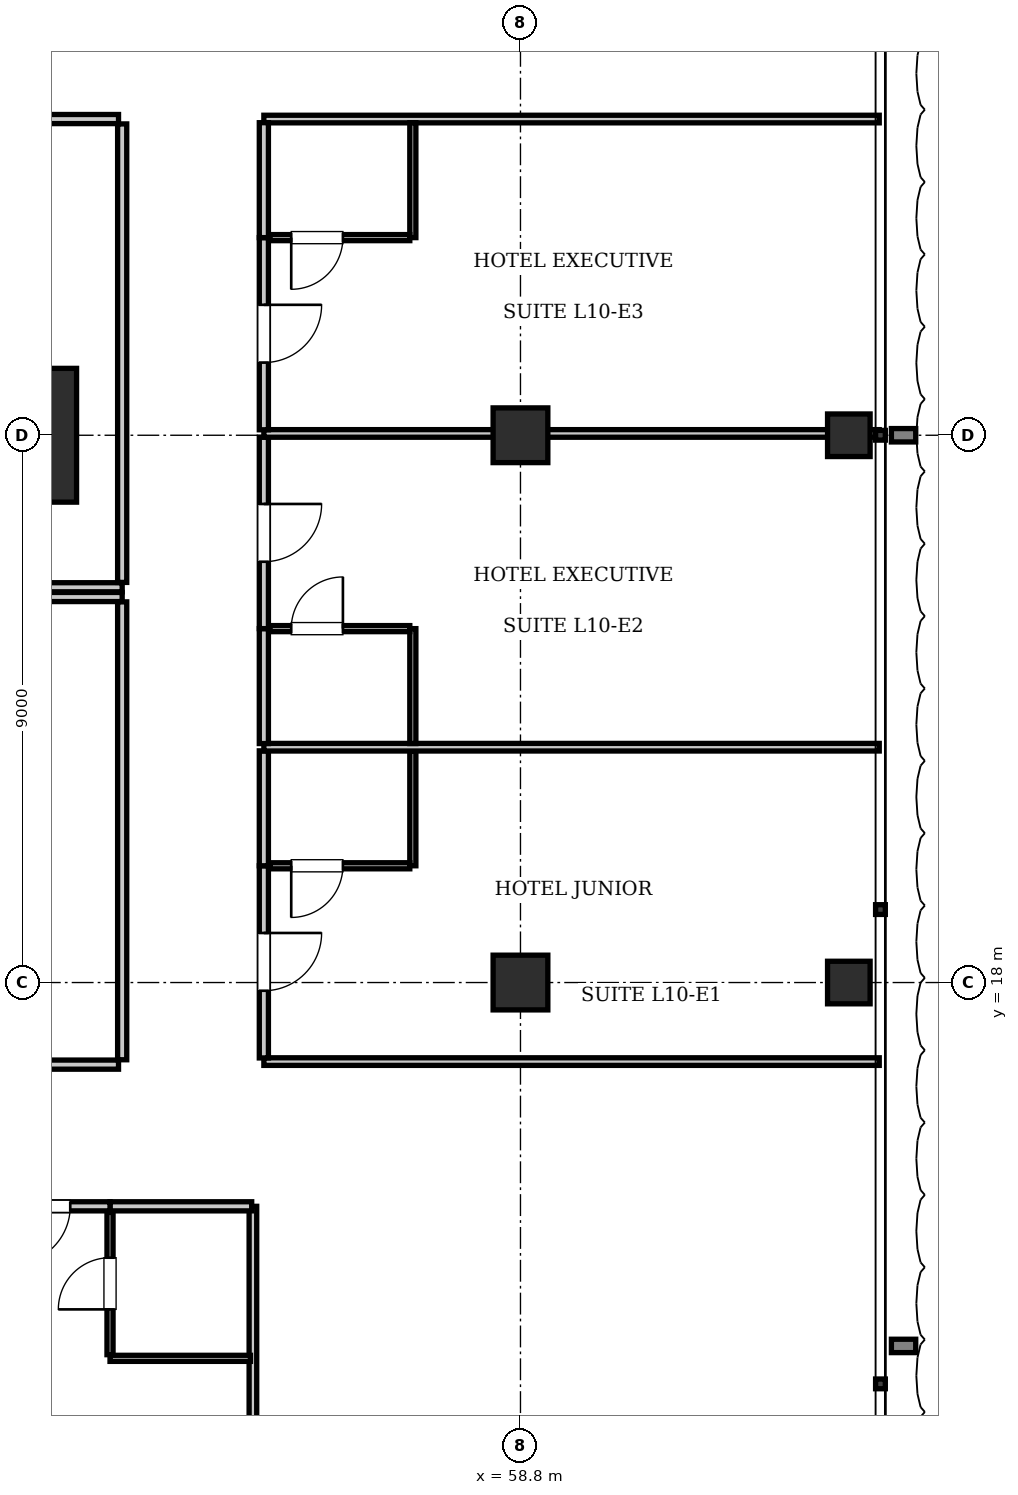
"""IFC4 building model, lengths in metres.
Left out: names, types, materials, properties, quantities, classifications, styles, units other than length and angle.
Written with IfcOpenShell. Run it as: python <this file> out.ifc"""

import sys

from ifc_helpers import new_model, si_unit, direction, frame, frame_2d, origin, origin_2d, place, context, subcontext, project, spatial, rectangle, i_section, extrude, element, fill, save


model = new_model("IFC4")
c1 = context("Model", 3, precision=1e-05, world=origin(), true_north=direction((0.0, 1.0)))
c2 = subcontext(c1, "Body", "Model", "MODEL_VIEW")
j1 = project(units=[si_unit("LENGTHUNIT", "METRE"), si_unit("PLANEANGLEUNIT", "RADIAN")], contexts=[c1])
p1 = place(None, origin())
s1 = spatial("IfcSite", under=j1, at=p1, CompositionType="ELEMENT")
p2 = place(p1, origin())
s2 = spatial("IfcBuilding", under=s1, at=p2, CompositionType="ELEMENT")
p3 = place(p2, frame((0.0, 0.0, 46.2)))
s3 = spatial("IfcBuildingStorey", under=s2, at=p3, CompositionType="ELEMENT", Elevation=46.2)
p4 = place(p3, frame((50.4, 27.0, 0.0), z_axis=(0.0, 0.0, 1.0), x_axis=(1.0, 0.0, 0.0)))
e1 = element("IfcColumn", 1, at=p4, inside=s3, PredefinedType="COLUMN", context=c2, shape_type="SweptSolid", body=[
    extrude(rectangle(XDim=2.2, YDim=2.2, at=origin_2d()), origin(), (0.0, 0.0, 1.0), 3.85),
])
for number, where, z_axis, x_axis in (
    (2, (58.8, 18.0, 0.0), (0.0, 0.0, 1.0), (1.0, 0.0, 0.0)),
    (3, (58.8, 27.0, 0.0), (0.0, 0.0, 1.0), (1.0, 0.0, 0.0)),
):
    element("IfcColumn", number, at=place(p3, frame(where, z_axis=z_axis, x_axis=x_axis)), inside=s3, PredefinedType="COLUMN", context=c2, shape_type="SweptSolid", body=[
        extrude(rectangle(XDim=0.9, YDim=0.9, at=origin_2d()), origin(), (0.0, 0.0, 1.0), 3.85),
    ])
for number, where, z_axis, x_axis in (
    (4, (64.2, 18.0, 0.0), (0.0, 0.0, 1.0), (1.0, 0.0, 0.0)),
    (5, (64.2, 27.0, 0.0), (0.0, 0.0, 1.0), (1.0, 0.0, 0.0)),
):
    element("IfcColumn", number, at=place(p3, frame(where, z_axis=z_axis, x_axis=x_axis)), inside=s3, PredefinedType="COLUMN", context=c2, shape_type="SweptSolid", body=[
        extrude(i_section(OverallWidth=0.7, OverallDepth=0.7, WebThickness=0.028, FlangeThickness=0.044, at=origin_2d()), origin(), (0.0, 0.0, 1.0), 3.85),
    ])
p5 = place(p3, frame((23.35, 24.5, 0.0), z_axis=(0.0, 0.0, 1.0), x_axis=(1.0, 0.0, 0.0)))
e6 = element("IfcWall", 6, at=p5, inside=s3, PredefinedType="PARTITIONING", context=c2, shape_type="SweptSolid", body=[
    extrude(rectangle(XDim=28.9, YDim=0.15, at=frame_2d((14.45, 0.0))), origin(), (0.0, 0.0, 1.0), 3.61),
])
p6 = place(p3, frame((52.25, 24.58, 0.0), z_axis=(0.0, 0.0, 1.0), x_axis=(0.0, 1.0, 0.0)))
e7 = element("IfcWall", 7, at=p6, inside=s3, PredefinedType="PARTITIONING", context=c2, shape_type="SweptSolid", body=[
    extrude(rectangle(XDim=7.54, YDim=0.15, at=frame_2d((3.77, 0.0))), origin(), (0.0, 0.0, 1.0), 3.61),
])
p7 = place(p3, frame((39.853, 32.2, 0.0), z_axis=(0.0, 0.0, 1.0), x_axis=(1.0, 0.0, 0.0)))
e8 = element("IfcWall", 8, at=p7, inside=s3, PredefinedType="PARTITIONING", context=c2, shape_type="SweptSolid", body=[
    extrude(rectangle(XDim=12.337, YDim=0.15, at=frame_2d((6.168, 0.0))), origin(), (0.0, 0.0, 1.0), 3.61),
])
p8 = place(p7, frame((5.719, 0.0, 0.0)))
e9 = element("IfcOpeningElement", 9, at=p8, cuts=e8, PredefinedType="OPENING", context=c2, shape_type="SweptSolid", body=[
    extrude(rectangle(XDim=0.9, YDim=2.1, at=frame_2d((0.45, 1.05))), frame((0.0, 0.085, 0.0), z_axis=(0.0, -1.0, 0.0), x_axis=(1.0, 0.0, 0.0)), (0.0, 0.0, 1.0), 0.17),
])
p9 = place(p3, frame((23.35, 24.34, 0.0), z_axis=(0.0, 0.0, 1.0), x_axis=(1.0, 0.0, 0.0)))
e10 = element("IfcWall", 10, at=p9, inside=s3, PredefinedType="PARTITIONING", context=c2, shape_type="SweptSolid", body=[
    extrude(rectangle(XDim=28.9, YDim=0.15, at=frame_2d((14.45, 0.0))), origin(), (0.0, 0.0, 1.0), 3.61),
])
p10 = place(p3, frame((52.25, 16.73, 0.0), z_axis=(0.0, 0.0, 1.0), x_axis=(0.0, 1.0, 0.0)))
e11 = element("IfcWall", 11, at=p10, inside=s3, PredefinedType="PARTITIONING", context=c2, shape_type="SweptSolid", body=[
    extrude(rectangle(XDim=7.53, YDim=0.15, at=frame_2d((3.765, 0.0))), origin(), (0.0, 0.0, 1.0), 3.61),
])
p11 = place(p3, frame((34.073, 16.65, 0.0), z_axis=(0.0, 0.0, 1.0), x_axis=(1.0, 0.0, 0.0)))
e12 = element("IfcWall", 12, at=p11, inside=s3, PredefinedType="PARTITIONING", context=c2, shape_type="SweptSolid", body=[
    extrude(rectangle(XDim=18.117, YDim=0.15, at=frame_2d((9.059, 0.0))), origin(), (0.0, 0.0, 1.0), 3.61),
])
p12 = place(p11, frame((8.729, 0.0, 0.0)))
e13 = element("IfcOpeningElement", 13, at=p12, cuts=e12, PredefinedType="OPENING", context=c2, shape_type="SweptSolid", body=[
    extrude(rectangle(XDim=0.9, YDim=2.1, at=frame_2d((0.45, 1.05))), frame((0.0, 0.085, 0.0), z_axis=(0.0, -1.0, 0.0), x_axis=(1.0, 0.0, 0.0)), (0.0, 0.0, 1.0), 0.17),
])
p13 = place(p3, frame((54.4, 0.1, 0.0), z_axis=(0.0, 0.0, 1.0), x_axis=(0.0, 1.0, 0.0)))
e14 = element("IfcWall", 14, at=p13, inside=s3, PredefinedType="PARTITIONING", context=c2, shape_type="SweptSolid", body=[
    extrude(rectangle(XDim=14.22, YDim=0.125, at=frame_2d((7.11, 0.0))), origin(), (0.0, 0.0, 1.0), 3.61),
])
p14 = place(p3, frame((52.05, 14.32, 0.0), z_axis=(0.0, 0.0, 1.0), x_axis=(1.0, 0.0, 0.0)))
e15 = element("IfcWall", 15, at=p14, inside=s3, PredefinedType="PARTITIONING", context=c2, shape_type="SweptSolid", body=[
    extrude(rectangle(XDim=2.33, YDim=0.15, at=frame_2d((1.165, 0.0))), origin(), (0.0, 0.0, 1.0), 3.61),
])
p15 = place(p3, frame((52.05, 11.82, 0.0), z_axis=(0.0, 0.0, 1.0), x_axis=(1.0, 0.0, 0.0)))
e16 = element("IfcWall", 16, at=p15, inside=s3, PredefinedType="PARTITIONING", context=c2, shape_type="SweptSolid", body=[
    extrude(rectangle(XDim=2.31, YDim=0.1, at=frame_2d((1.155, 0.0))), origin(), (0.0, 0.0, 1.0), 3.61),
])
p16 = place(p3, frame((52.05, 11.88, 0.0), z_axis=(0.0, 0.0, 1.0), x_axis=(0.0, 1.0, 0.0)))
e17 = element("IfcWall", 17, at=p16, inside=s3, PredefinedType="PARTITIONING", context=c2, shape_type="SweptSolid", body=[
    extrude(rectangle(XDim=2.34, YDim=0.1, at=frame_2d((1.17, 0.0))), origin(), (0.0, 0.0, 1.0), 3.61),
])
p17 = place(p16, frame((0.745, 0.0, 0.0)))
e18 = element("IfcOpeningElement", 18, at=p17, cuts=e17, PredefinedType="OPENING", context=c2, shape_type="SweptSolid", body=[
    extrude(rectangle(XDim=0.85, YDim=2.1, at=frame_2d((0.425, 1.05))), frame((0.0, 0.06, 0.0), z_axis=(0.0, -1.0, 0.0), x_axis=(1.0, 0.0, 0.0)), (0.0, 0.0, 1.0), 0.12),
])
p18 = place(p3, frame((49.792, 14.32, 0.0), z_axis=(0.0, 0.0, 1.0), x_axis=(1.0, 0.0, 0.0)))
e19 = element("IfcWall", 19, at=p18, inside=s3, PredefinedType="PARTITIONING", context=c2, shape_type="SweptSolid", body=[
    extrude(rectangle(XDim=2.258, YDim=0.15, at=frame_2d((1.129, 0.0))), origin(), (0.0, 0.0, 1.0), 3.61),
])
p19 = place(p18, frame((0.654, 0.0, 0.0)))
e20 = element("IfcOpeningElement", 20, at=p19, cuts=e19, PredefinedType="OPENING", context=c2, shape_type="SweptSolid", body=[
    extrude(rectangle(XDim=0.95, YDim=2.15, at=frame_2d((0.475, 1.075))), frame((0.0, 0.085, 0.0), z_axis=(0.0, -1.0, 0.0), x_axis=(1.0, 0.0, 0.0)), (0.0, 0.0, 1.0), 0.17),
])
for number, where, z_axis, x_axis in (
    (21, (54.58, 16.7, 0.0), (0.0, 0.0, 1.0), (1.0, 0.0, 0.0)),
    (22, (54.58, 32.2, 0.0), (0.0, 0.0, 1.0), (1.0, 0.0, 0.0)),
):
    element("IfcWall", number, at=place(p3, frame(where, z_axis=z_axis, x_axis=x_axis)), inside=s3, PredefinedType="PARTITIONING", context=c2, shape_type="SweptSolid", body=[
        extrude(rectangle(XDim=10.12, YDim=0.125, at=frame_2d((5.06, 0.0))), origin(), (0.0, 0.0, 1.0), 3.61),
    ])
p20 = place(p3, frame((54.58, 16.76, 0.0), z_axis=(0.0, 0.0, 1.0), x_axis=(0.0, 1.0, 0.0)))
e23 = element("IfcWall", 23, at=p20, inside=s3, PredefinedType="PARTITIONING", context=c2, shape_type="SweptSolid", body=[
    extrude(rectangle(XDim=3.16, YDim=0.15, at=frame_2d((1.58, 0.0))), origin(), (0.0, 0.0, 1.0), 3.403),
])
p21 = place(p20, frame((1.105, 0.0, 0.0)))
e24 = element("IfcOpeningElement", 24, at=p21, cuts=e23, PredefinedType="OPENING", context=c2, shape_type="SweptSolid", body=[
    extrude(rectangle(XDim=0.95, YDim=2.15, at=frame_2d((0.475, 1.075))), frame((0.0, 0.085, 0.0), z_axis=(0.0, -1.0, 0.0), x_axis=(1.0, 0.0, 0.0)), (0.0, 0.0, 1.0), 0.17),
])
p22 = place(p3, frame((54.58, 19.92, 0.0), z_axis=(0.0, 0.0, 1.0), x_axis=(0.0, 1.0, 0.0)))
e25 = element("IfcWall", 25, at=p22, inside=s3, PredefinedType="PARTITIONING", context=c2, shape_type="SweptSolid", body=[
    extrude(rectangle(XDim=1.89, YDim=0.15, at=frame_2d((0.945, 0.0))), origin(), (0.0, 0.0, 1.0), 3.457),
])
p23 = place(p3, frame((57.03, 19.92, 0.0), z_axis=(0.0, 0.0, 1.0), x_axis=(0.0, 1.0, 0.0)))
e26 = element("IfcWall", 26, at=p23, inside=s3, PredefinedType="PARTITIONING", context=c2, shape_type="SweptSolid", body=[
    extrude(rectangle(XDim=1.89, YDim=0.1, at=frame_2d((0.945, 0.0))), origin(), (0.0, 0.0, 1.0), 3.61),
])
p24 = place(p3, frame((54.68, 19.92, 0.0), z_axis=(0.0, 0.0, 1.0), x_axis=(1.0, 0.0, 0.0)))
e27 = element("IfcWall", 27, at=p24, inside=s3, PredefinedType="PARTITIONING", context=c2, shape_type="SweptSolid", body=[
    extrude(rectangle(XDim=2.3, YDim=0.1, at=frame_2d((1.15, 0.0))), origin(), (0.0, 0.0, 1.0), 3.61),
])
p25 = place(p24, frame((0.35, 0.0, 0.0)))
e28 = element("IfcOpeningElement", 28, at=p25, cuts=e27, PredefinedType="OPENING", context=c2, shape_type="SweptSolid", body=[
    extrude(rectangle(XDim=0.85, YDim=2.1, at=frame_2d((0.425, 1.05))), frame((0.0, 0.06, 0.0), z_axis=(0.0, -1.0, 0.0), x_axis=(1.0, 0.0, 0.0)), (0.0, 0.0, 1.0), 0.12),
])
p26 = place(p3, frame((54.58, 21.87, 0.0), z_axis=(0.0, 0.0, 1.0), x_axis=(1.0, 0.0, 0.0)))
e29 = element("IfcWall", 29, at=p26, inside=s3, PredefinedType="PARTITIONING", context=c2, shape_type="SweptSolid", body=[
    extrude(rectangle(XDim=10.12, YDim=0.125, at=frame_2d((5.06, 0.0))), origin(), (0.0, 0.0, 1.0), 3.61),
])
p27 = place(p3, frame((54.58, 21.93, 0.0), z_axis=(0.0, 0.0, 1.0), x_axis=(0.0, 1.0, 0.0)))
e30 = element("IfcWall", 30, at=p27, inside=s3, PredefinedType="PARTITIONING", context=c2, shape_type="SweptSolid", body=[
    extrude(rectangle(XDim=1.89, YDim=0.15, at=frame_2d((0.945, 0.0))), origin(), (0.0, 0.0, 1.0), 3.457),
])
p28 = place(p3, frame((54.58, 23.82, 0.0), z_axis=(0.0, 0.0, 1.0), x_axis=(0.0, 1.0, 0.0)))
e31 = element("IfcWall", 31, at=p28, inside=s3, PredefinedType="PARTITIONING", context=c2, shape_type="SweptSolid", body=[
    extrude(rectangle(XDim=3.15, YDim=0.15, at=frame_2d((1.575, 0.0))), origin(), (0.0, 0.0, 1.0), 3.457),
])
p29 = place(p28, frame((1.1, 0.0, 0.0)))
e32 = element("IfcOpeningElement", 32, at=p29, cuts=e31, PredefinedType="OPENING", context=c2, shape_type="SweptSolid", body=[
    extrude(rectangle(XDim=0.95, YDim=2.15, at=frame_2d((0.475, 1.075))), frame((0.0, 0.085, 0.0), z_axis=(0.0, -1.0, 0.0), x_axis=(1.0, 0.0, 0.0)), (0.0, 0.0, 1.0), 0.17),
])
p30 = place(p3, frame((57.03, 21.93, 0.0), z_axis=(0.0, 0.0, 1.0), x_axis=(0.0, 1.0, 0.0)))
e33 = element("IfcWall", 33, at=p30, inside=s3, PredefinedType="PARTITIONING", context=c2, shape_type="SweptSolid", body=[
    extrude(rectangle(XDim=1.89, YDim=0.1, at=frame_2d((0.945, 0.0))), origin(), (0.0, 0.0, 1.0), 3.61),
])
p31 = place(p3, frame((54.68, 23.82, 0.0), z_axis=(0.0, 0.0, 1.0), x_axis=(1.0, 0.0, 0.0)))
e34 = element("IfcWall", 34, at=p31, inside=s3, PredefinedType="PARTITIONING", context=c2, shape_type="SweptSolid", body=[
    extrude(rectangle(XDim=2.3, YDim=0.1, at=frame_2d((1.15, 0.0))), origin(), (0.0, 0.0, 1.0), 3.61),
])
p32 = place(p31, frame((0.35, 0.0, 0.0)))
e35 = element("IfcOpeningElement", 35, at=p32, cuts=e34, PredefinedType="OPENING", context=c2, shape_type="SweptSolid", body=[
    extrude(rectangle(XDim=0.85, YDim=2.1, at=frame_2d((0.425, 1.05))), frame((0.0, 0.06, 0.0), z_axis=(0.0, -1.0, 0.0), x_axis=(1.0, 0.0, 0.0)), (0.0, 0.0, 1.0), 0.12),
])
p33 = place(p3, frame((54.58, 27.03, 0.0), z_axis=(0.0, 0.0, 1.0), x_axis=(1.0, 0.0, 0.0)))
e36 = element("IfcWall", 36, at=p33, inside=s3, PredefinedType="PARTITIONING", context=c2, shape_type="SweptSolid", body=[
    extrude(rectangle(XDim=10.12, YDim=0.125, at=frame_2d((5.06, 0.0))), origin(), (0.0, 0.0, 1.0), 2.988),
])
p34 = place(p3, frame((54.58, 27.09, 0.0), z_axis=(0.0, 0.0, 1.0), x_axis=(0.0, 1.0, 0.0)))
e37 = element("IfcWall", 37, at=p34, inside=s3, PredefinedType="PARTITIONING", context=c2, shape_type="SweptSolid", body=[
    extrude(rectangle(XDim=3.16, YDim=0.15, at=frame_2d((1.58, 0.0))), origin(), (0.0, 0.0, 1.0), 3.207),
])
p35 = place(p34, frame((1.105, 0.0, 0.0)))
e38 = element("IfcOpeningElement", 38, at=p35, cuts=e37, PredefinedType="OPENING", context=c2, shape_type="SweptSolid", body=[
    extrude(rectangle(XDim=0.95, YDim=2.15, at=frame_2d((0.475, 1.075))), frame((0.0, 0.085, 0.0), z_axis=(0.0, -1.0, 0.0), x_axis=(1.0, 0.0, 0.0)), (0.0, 0.0, 1.0), 0.17),
])
p36 = place(p3, frame((54.58, 30.25, 0.0), z_axis=(0.0, 0.0, 1.0), x_axis=(0.0, 1.0, 0.0)))
e39 = element("IfcWall", 39, at=p36, inside=s3, PredefinedType="PARTITIONING", context=c2, shape_type="SweptSolid", body=[
    extrude(rectangle(XDim=1.89, YDim=0.15, at=frame_2d((0.945, 0.0))), origin(), (0.0, 0.0, 1.0), 3.207),
])
p37 = place(p3, frame((57.03, 30.25, 0.0), z_axis=(0.0, 0.0, 1.0), x_axis=(0.0, 1.0, 0.0)))
e40 = element("IfcWall", 40, at=p37, inside=s3, PredefinedType="PARTITIONING", context=c2, shape_type="SweptSolid", body=[
    extrude(rectangle(XDim=1.89, YDim=0.1, at=frame_2d((0.945, 0.0))), origin(), (0.0, 0.0, 1.0), 3.61),
])
p38 = place(p3, frame((54.68, 30.25, 0.0), z_axis=(0.0, 0.0, 1.0), x_axis=(1.0, 0.0, 0.0)))
e41 = element("IfcWall", 41, at=p38, inside=s3, PredefinedType="PARTITIONING", context=c2, shape_type="SweptSolid", body=[
    extrude(rectangle(XDim=2.3, YDim=0.1, at=frame_2d((1.15, 0.0))), origin(), (0.0, 0.0, 1.0), 3.61),
])
p39 = place(p38, frame((0.35, 0.0, 0.0)))
e42 = element("IfcOpeningElement", 42, at=p39, cuts=e41, PredefinedType="OPENING", context=c2, shape_type="SweptSolid", body=[
    extrude(rectangle(XDim=0.85, YDim=2.1, at=frame_2d((0.425, 1.05))), frame((0.0, 0.06, 0.0), z_axis=(0.0, -1.0, 0.0), x_axis=(1.0, 0.0, 0.0)), (0.0, 0.0, 1.0), 0.12),
])
p40 = place(p17, origin())
e43 = element("IfcDoor", 43, at=p40, inside=s3, OperationType="SINGLE_SWING_LEFT", PredefinedType="DOOR", context=c2, shape_type="SweptSolid", body=[
    extrude(rectangle(XDim=0.85, YDim=2.1, at=frame_2d((0.425, 1.05))), frame((0.0, 0.025, 0.0), z_axis=(0.0, -1.0, 0.0), x_axis=(1.0, 0.0, 0.0)), (0.0, 0.0, 1.0), 0.05),
])
fill(e18, e43)
p41 = place(p19, frame((0.95, 0.0, 0.0), z_axis=(0.0, 0.0, 1.0), x_axis=(-1.0, 0.0, 0.0)))
e44 = element("IfcDoor", 44, at=p41, inside=s3, OperationType="SINGLE_SWING_RIGHT", PredefinedType="DOOR", context=c2, shape_type="SweptSolid", body=[
    extrude(rectangle(XDim=0.95, YDim=2.15, at=frame_2d((0.475, 1.075))), frame((0.0, 0.025, 0.0), z_axis=(0.0, -1.0, 0.0), x_axis=(1.0, 0.0, 0.0)), (0.0, 0.0, 1.0), 0.05),
])
fill(e20, e44)
p42 = place(p25, frame((0.85, 0.0, 0.0), z_axis=(0.0, 0.0, 1.0), x_axis=(-1.0, 0.0, 0.0)))
e45 = element("IfcDoor", 45, at=p42, inside=s3, OperationType="SINGLE_SWING_RIGHT", PredefinedType="DOOR", context=c2, shape_type="SweptSolid", body=[
    extrude(rectangle(XDim=0.85, YDim=2.1, at=frame_2d((0.425, 1.05))), frame((0.0, 0.025, 0.0), z_axis=(0.0, -1.0, 0.0), x_axis=(1.0, 0.0, 0.0)), (0.0, 0.0, 1.0), 0.05),
])
fill(e28, e45)
p43 = place(p21, frame((0.95, 0.0, 0.0), z_axis=(0.0, 0.0, 1.0), x_axis=(-1.0, 0.0, 0.0)))
e46 = element("IfcDoor", 46, at=p43, inside=s3, OperationType="SINGLE_SWING_LEFT", PredefinedType="DOOR", context=c2, shape_type="SweptSolid", body=[
    extrude(rectangle(XDim=0.95, YDim=2.15, at=frame_2d((0.475, 1.075))), frame((0.0, 0.025, 0.0), z_axis=(0.0, -1.0, 0.0), x_axis=(1.0, 0.0, 0.0)), (0.0, 0.0, 1.0), 0.05),
])
fill(e24, e46)
p44 = place(p32, origin())
e47 = element("IfcDoor", 47, at=p44, inside=s3, OperationType="SINGLE_SWING_RIGHT", PredefinedType="DOOR", context=c2, shape_type="SweptSolid", body=[
    extrude(rectangle(XDim=0.85, YDim=2.1, at=frame_2d((0.425, 1.05))), frame((0.0, 0.025, 0.0), z_axis=(0.0, -1.0, 0.0), x_axis=(1.0, 0.0, 0.0)), (0.0, 0.0, 1.0), 0.05),
])
fill(e35, e47)
p45 = place(p29, frame((0.95, 0.0, 0.0), z_axis=(0.0, 0.0, 1.0), x_axis=(-1.0, 0.0, 0.0)))
e48 = element("IfcDoor", 48, at=p45, inside=s3, OperationType="SINGLE_SWING_LEFT", PredefinedType="DOOR", context=c2, shape_type="SweptSolid", body=[
    extrude(rectangle(XDim=0.95, YDim=2.15, at=frame_2d((0.475, 1.075))), frame((0.0, 0.025, 0.0), z_axis=(0.0, -1.0, 0.0), x_axis=(1.0, 0.0, 0.0)), (0.0, 0.0, 1.0), 0.05),
])
fill(e32, e48)
p46 = place(p39, frame((0.85, 0.0, 0.0), z_axis=(0.0, 0.0, 1.0), x_axis=(-1.0, 0.0, 0.0)))
e49 = element("IfcDoor", 49, at=p46, inside=s3, OperationType="SINGLE_SWING_RIGHT", PredefinedType="DOOR", context=c2, shape_type="SweptSolid", body=[
    extrude(rectangle(XDim=0.85, YDim=2.1, at=frame_2d((0.425, 1.05))), frame((0.0, 0.025, 0.0), z_axis=(0.0, -1.0, 0.0), x_axis=(1.0, 0.0, 0.0)), (0.0, 0.0, 1.0), 0.05),
])
fill(e42, e49)
p47 = place(p35, frame((0.95, 0.0, 0.0), z_axis=(0.0, 0.0, 1.0), x_axis=(-1.0, 0.0, 0.0)))
e50 = element("IfcDoor", 50, at=p47, inside=s3, OperationType="SINGLE_SWING_LEFT", PredefinedType="DOOR", context=c2, shape_type="SweptSolid", body=[
    extrude(rectangle(XDim=0.95, YDim=2.15, at=frame_2d((0.475, 1.075))), frame((0.0, 0.025, 0.0), z_axis=(0.0, -1.0, 0.0), x_axis=(1.0, 0.0, 0.0)), (0.0, 0.0, 1.0), 0.05),
])
fill(e38, e50)
save(model, sys.argv[1])
